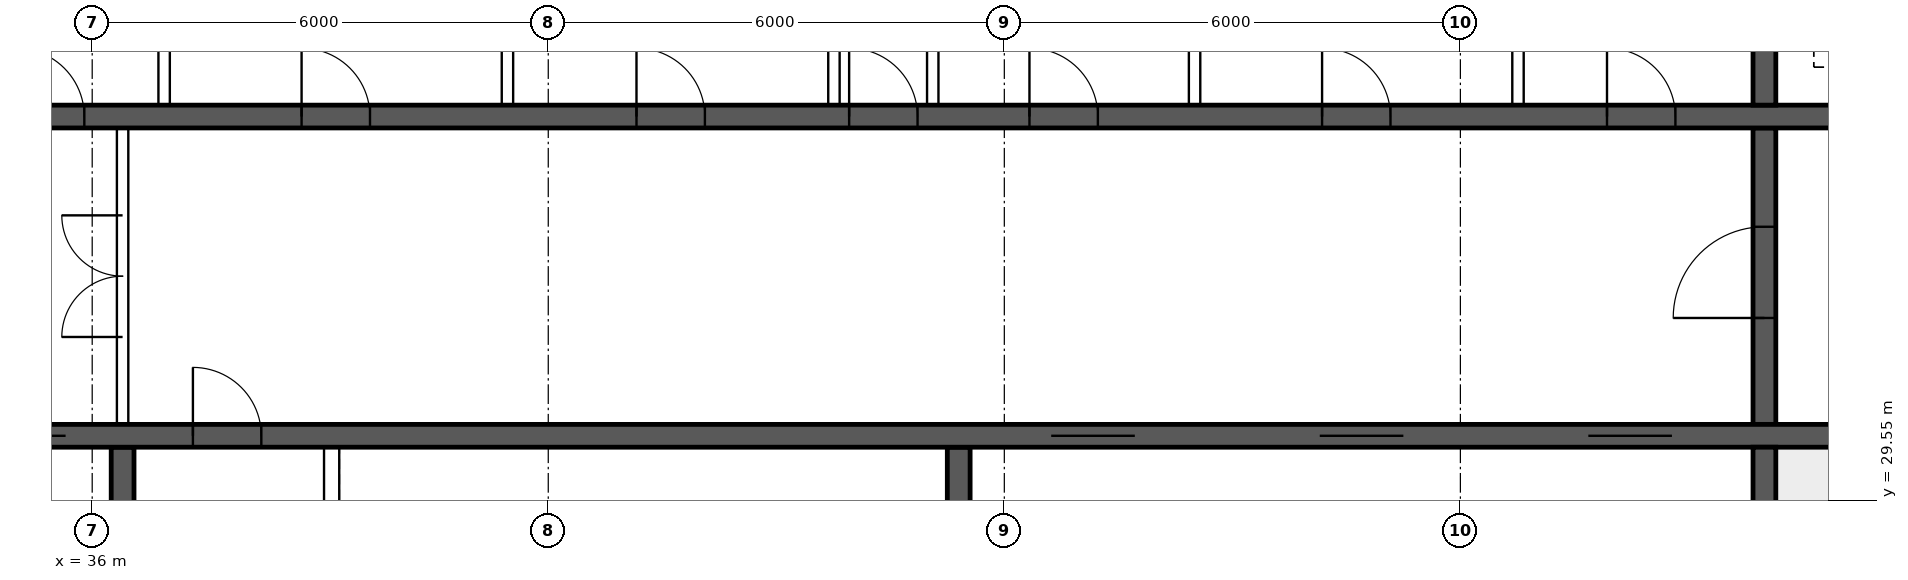
"""IFC4 building model, lengths in metres.
Left out: names, types, materials, properties, quantities, classifications, styles, units other than length and angle.
Written with IfcOpenShell. Run it as: python <this file> out.ifc"""

import sys

from ifc_helpers import new_model, si_unit, direction, frame, frame_2d, origin, place, context, subcontext, project, spatial, rectangle, extrude, element, fill, save


model = new_model("IFC4")
c1 = context("Model", 3, precision=1e-05, world=origin(), true_north=direction((0.0, 1.0)))
c2 = subcontext(c1, "Body", "Model", "MODEL_VIEW")
j1 = project(units=[si_unit("LENGTHUNIT", "METRE"), si_unit("PLANEANGLEUNIT", "RADIAN")], contexts=[c1])
p1 = place(None, origin())
s1 = spatial("IfcSite", under=j1, at=p1, CompositionType="ELEMENT")
p2 = place(p1, origin())
s2 = spatial("IfcBuilding", under=s1, at=p2, CompositionType="ELEMENT")
p3 = place(p2, frame((0.0, 0.0, 114.4)))
s3 = spatial("IfcBuildingStorey", under=s2, at=p3, CompositionType="ELEMENT", Elevation=114.4)
p4 = place(p3, frame((18.475, 30.4, 0.0), z_axis=(0.0, 0.0, 1.0), x_axis=(1.0, 0.0, 0.0)))
e1 = element("IfcWall", 1, at=p4, inside=s3, PredefinedType="SHEAR", context=c2, shape_type="SweptSolid", body=[
    extrude(rectangle(XDim=47.05, YDim=0.3, at=frame_2d((23.525, 0.0))), origin(), (0.0, 0.0, 1.0), 3.75),
])
p5 = place(p4, frame((0.4, 0.0, 0.0)))
e2 = element("IfcOpeningElement", 2, at=p5, cuts=e1, PredefinedType="OPENING", context=c2, shape_type="SweptSolid", body=[
    extrude(rectangle(XDim=1.0, YDim=2.1, at=frame_2d((0.5, 1.05))), frame((0.0, 0.16, 0.0), z_axis=(0.0, -1.0, 0.0), x_axis=(1.0, 0.0, 0.0)), (0.0, 0.0, 1.0), 0.32),
])
p6 = place(p4, frame((45.65, 0.0, 0.0)))
e3 = element("IfcOpeningElement", 3, at=p6, cuts=e1, PredefinedType="OPENING", context=c2, shape_type="SweptSolid", body=[
    extrude(rectangle(XDim=1.0, YDim=2.1, at=frame_2d((0.5, 1.05))), frame((0.0, 0.16, 0.0), z_axis=(0.0, -1.0, 0.0), x_axis=(1.0, 0.0, 0.0)), (0.0, 0.0, 1.0), 0.32),
])
p7 = place(p4, frame((8.275, 0.0, 0.0)))
e4 = element("IfcOpeningElement", 4, at=p7, cuts=e1, PredefinedType="OPENING", context=c2, shape_type="SweptSolid", body=[
    extrude(rectangle(XDim=1.1, YDim=2.1, at=frame_2d((0.55, 1.05))), frame((0.0, 0.16, 0.0), z_axis=(0.0, -1.0, 0.0), x_axis=(1.0, 0.0, 0.0)), (0.0, 0.0, 1.0), 0.32),
])
p8 = place(p4, frame((10.875, 0.0, 0.0)))
e5 = element("IfcOpeningElement", 5, at=p8, cuts=e1, PredefinedType="OPENING", context=c2, shape_type="SweptSolid", body=[
    extrude(rectangle(XDim=1.1, YDim=2.1, at=frame_2d((0.55, 1.05))), frame((0.0, 0.16, 0.0), z_axis=(0.0, -1.0, 0.0), x_axis=(1.0, 0.0, 0.0)), (0.0, 0.0, 1.0), 0.32),
])
p9 = place(p4, frame((13.475, 0.0, 0.0)))
e6 = element("IfcOpeningElement", 6, at=p9, cuts=e1, PredefinedType="OPENING", context=c2, shape_type="SweptSolid", body=[
    extrude(rectangle(XDim=1.1, YDim=2.1, at=frame_2d((0.55, 1.05))), frame((0.0, 0.16, 0.0), z_axis=(0.0, -1.0, 0.0), x_axis=(1.0, 0.0, 0.0)), (0.0, 0.0, 1.0), 0.32),
])
p10 = place(p4, frame((16.075, 0.0, 0.0)))
e7 = element("IfcOpeningElement", 7, at=p10, cuts=e1, PredefinedType="OPENING", context=c2, shape_type="SweptSolid", body=[
    extrude(rectangle(XDim=1.1, YDim=2.1, at=frame_2d((0.55, 1.05))), frame((0.0, 0.16, 0.0), z_axis=(0.0, -1.0, 0.0), x_axis=(1.0, 0.0, 0.0)), (0.0, 0.0, 1.0), 0.32),
])
p11 = place(p4, frame((18.85, 0.0, 0.0)))
e8 = element("IfcOpeningElement", 8, at=p11, cuts=e1, PredefinedType="OPENING", context=c2, shape_type="SweptSolid", body=[
    extrude(rectangle(XDim=0.9, YDim=2.1, at=frame_2d((0.45, 1.05))), frame((0.0, 0.16, 0.0), z_axis=(0.0, -1.0, 0.0), x_axis=(1.0, 0.0, 0.0)), (0.0, 0.0, 1.0), 0.32),
])
p12 = place(p4, frame((30.142, 0.0, 0.0)))
e9 = element("IfcOpeningElement", 9, at=p12, cuts=e1, PredefinedType="OPENING", context=c2, shape_type="SweptSolid", body=[
    extrude(rectangle(XDim=1.1, YDim=2.1, at=frame_2d((0.55, 1.05))), frame((0.0, 0.16, 0.0), z_axis=(0.0, -1.0, 0.0), x_axis=(1.0, 0.0, 0.0)), (0.0, 0.0, 1.0), 0.32),
])
p13 = place(p4, frame((33.675, 0.0, 0.0)))
e10 = element("IfcOpeningElement", 10, at=p13, cuts=e1, PredefinedType="OPENING", context=c2, shape_type="SweptSolid", body=[
    extrude(rectangle(XDim=1.1, YDim=2.1, at=frame_2d((0.55, 1.05))), frame((0.0, 0.16, 0.0), z_axis=(0.0, -1.0, 0.0), x_axis=(1.0, 0.0, 0.0)), (0.0, 0.0, 1.0), 0.32),
])
p14 = place(p4, frame((37.208, 0.0, 0.0)))
e11 = element("IfcOpeningElement", 11, at=p14, cuts=e1, PredefinedType="OPENING", context=c2, shape_type="SweptSolid", body=[
    extrude(rectangle(XDim=1.1, YDim=2.1, at=frame_2d((0.55, 1.05))), frame((0.0, 0.16, 0.0), z_axis=(0.0, -1.0, 0.0), x_axis=(1.0, 0.0, 0.0)), (0.0, 0.0, 1.0), 0.32),
])
p15 = place(p3, frame((18.475, 34.6, 0.0), z_axis=(0.0, 0.0, 1.0), x_axis=(1.0, 0.0, 0.0)))
e12 = element("IfcWall", 12, at=p15, inside=s3, PredefinedType="SHEAR", context=c2, shape_type="SweptSolid", body=[
    extrude(rectangle(XDim=47.05, YDim=0.3, at=frame_2d((23.525, 0.0))), origin(), (0.0, 0.0, 1.0), 3.75),
])
p16 = place(p15, frame((0.9, 0.0, 0.0)))
e13 = element("IfcOpeningElement", 13, at=p16, cuts=e12, PredefinedType="OPENING", context=c2, shape_type="SweptSolid", body=[
    extrude(rectangle(XDim=1.1, YDim=2.1, at=frame_2d((0.55, 1.05))), frame((0.0, 0.16, 0.0), z_axis=(0.0, -1.0, 0.0), x_axis=(1.0, 0.0, 0.0)), (0.0, 0.0, 1.0), 0.32),
])
p17 = place(p15, frame((45.05, 0.0, 0.0)))
e14 = element("IfcOpeningElement", 14, at=p17, cuts=e12, PredefinedType="OPENING", context=c2, shape_type="SweptSolid", body=[
    extrude(rectangle(XDim=1.1, YDim=2.1, at=frame_2d((0.55, 1.05))), frame((0.0, 0.16, 0.0), z_axis=(0.0, -1.0, 0.0), x_axis=(1.0, 0.0, 0.0)), (0.0, 0.0, 1.0), 0.32),
])
p18 = place(p15, frame((4.125, 0.0, 0.0)))
e15 = element("IfcOpeningElement", 15, at=p18, cuts=e12, PredefinedType="OPENING", context=c2, shape_type="SweptSolid", body=[
    extrude(rectangle(XDim=0.9, YDim=2.1, at=frame_2d((0.45, 1.05))), frame((0.0, 0.16, 0.0), z_axis=(0.0, -1.0, 0.0), x_axis=(1.0, 0.0, 0.0)), (0.0, 0.0, 1.0), 0.32),
])
p19 = place(p15, frame((42.025, 0.0, 0.0)))
e16 = element("IfcOpeningElement", 16, at=p19, cuts=e12, PredefinedType="OPENING", context=c2, shape_type="SweptSolid", body=[
    extrude(rectangle(XDim=0.9, YDim=2.1, at=frame_2d((0.45, 1.05))), frame((0.0, 0.16, 0.0), z_axis=(0.0, -1.0, 0.0), x_axis=(1.0, 0.0, 0.0)), (0.0, 0.0, 1.0), 0.32),
])
p20 = place(p15, frame((8.9, 0.0, 0.0)))
e17 = element("IfcOpeningElement", 17, at=p20, cuts=e12, PredefinedType="OPENING", context=c2, shape_type="SweptSolid", body=[
    extrude(rectangle(XDim=0.9, YDim=2.1, at=frame_2d((0.45, 1.05))), frame((0.0, 0.16, 0.0), z_axis=(0.0, -1.0, 0.0), x_axis=(1.0, 0.0, 0.0)), (0.0, 0.0, 1.0), 0.32),
])
p21 = place(p15, frame((12.874, 0.0, 0.0)))
e18 = element("IfcOpeningElement", 18, at=p21, cuts=e12, PredefinedType="OPENING", context=c2, shape_type="SweptSolid", body=[
    extrude(rectangle(XDim=0.9, YDim=2.1, at=frame_2d((0.45, 1.05))), frame((0.0, 0.16, 0.0), z_axis=(0.0, -1.0, 0.0), x_axis=(1.0, 0.0, 0.0)), (0.0, 0.0, 1.0), 0.32),
])
p22 = place(p15, frame((16.521, 0.0, 0.0)))
e19 = element("IfcOpeningElement", 19, at=p22, cuts=e12, PredefinedType="OPENING", context=c2, shape_type="SweptSolid", body=[
    extrude(rectangle(XDim=0.9, YDim=2.1, at=frame_2d((0.45, 1.05))), frame((0.0, 0.16, 0.0), z_axis=(0.0, -1.0, 0.0), x_axis=(1.0, 0.0, 0.0)), (0.0, 0.0, 1.0), 0.32),
])
p23 = place(p15, frame((20.28, 0.0, 0.0)))
e20 = element("IfcOpeningElement", 20, at=p23, cuts=e12, PredefinedType="OPENING", context=c2, shape_type="SweptSolid", body=[
    extrude(rectangle(XDim=0.9, YDim=2.1, at=frame_2d((0.45, 1.05))), frame((0.0, 0.16, 0.0), z_axis=(0.0, -1.0, 0.0), x_axis=(1.0, 0.0, 0.0)), (0.0, 0.0, 1.0), 0.32),
])
p24 = place(p15, frame((24.686, 0.0, 0.0)))
e21 = element("IfcOpeningElement", 21, at=p24, cuts=e12, PredefinedType="OPENING", context=c2, shape_type="SweptSolid", body=[
    extrude(rectangle(XDim=0.9, YDim=2.1, at=frame_2d((0.45, 1.05))), frame((0.0, 0.16, 0.0), z_axis=(0.0, -1.0, 0.0), x_axis=(1.0, 0.0, 0.0)), (0.0, 0.0, 1.0), 0.32),
])
p25 = place(p15, frame((27.483, 0.0, 0.0)))
e22 = element("IfcOpeningElement", 22, at=p25, cuts=e12, PredefinedType="OPENING", context=c2, shape_type="SweptSolid", body=[
    extrude(rectangle(XDim=0.9, YDim=2.1, at=frame_2d((0.45, 1.05))), frame((0.0, 0.16, 0.0), z_axis=(0.0, -1.0, 0.0), x_axis=(1.0, 0.0, 0.0)), (0.0, 0.0, 1.0), 0.32),
])
p26 = place(p15, frame((29.856, 0.0, 0.0)))
e23 = element("IfcOpeningElement", 23, at=p26, cuts=e12, PredefinedType="OPENING", context=c2, shape_type="SweptSolid", body=[
    extrude(rectangle(XDim=0.9, YDim=2.1, at=frame_2d((0.45, 1.05))), frame((0.0, 0.16, 0.0), z_axis=(0.0, -1.0, 0.0), x_axis=(1.0, 0.0, 0.0)), (0.0, 0.0, 1.0), 0.32),
])
p27 = place(p15, frame((33.706, 0.0, 0.0)))
e24 = element("IfcOpeningElement", 24, at=p27, cuts=e12, PredefinedType="OPENING", context=c2, shape_type="SweptSolid", body=[
    extrude(rectangle(XDim=0.9, YDim=2.1, at=frame_2d((0.45, 1.05))), frame((0.0, 0.16, 0.0), z_axis=(0.0, -1.0, 0.0), x_axis=(1.0, 0.0, 0.0)), (0.0, 0.0, 1.0), 0.32),
])
p28 = place(p15, frame((37.454, 0.0, 0.0)))
e25 = element("IfcOpeningElement", 25, at=p28, cuts=e12, PredefinedType="OPENING", context=c2, shape_type="SweptSolid", body=[
    extrude(rectangle(XDim=0.9, YDim=2.1, at=frame_2d((0.45, 1.05))), frame((0.0, 0.16, 0.0), z_axis=(0.0, -1.0, 0.0), x_axis=(1.0, 0.0, 0.0)), (0.0, 0.0, 1.0), 0.32),
])
p29 = place(p3, frame((58.0, 26.275, 0.0), z_axis=(0.0, 0.0, 1.0), x_axis=(0.0, 1.0, 0.0)))
e26 = element("IfcWall", 26, at=p29, inside=s3, PredefinedType="SHEAR", context=c2, shape_type="SweptSolid", body=[
    extrude(rectangle(XDim=3.975, YDim=0.3, at=frame_2d((1.988, 0.0))), origin(), (0.0, 0.0, 1.0), 3.75),
])
p30 = place(p3, frame((58.0, 30.55, 0.0), z_axis=(0.0, 0.0, 1.0), x_axis=(0.0, 1.0, 0.0)))
e27 = element("IfcWall", 27, at=p30, inside=s3, PredefinedType="SHEAR", context=c2, shape_type="SweptSolid", body=[
    extrude(rectangle(XDim=3.9, YDim=0.3, at=frame_2d((1.95, 0.0))), origin(), (0.0, 0.0, 1.0), 3.75),
])
p31 = place(p30, frame((1.4, 0.0, 0.0)))
e28 = element("IfcOpeningElement", 28, at=p31, cuts=e27, PredefinedType="OPENING", context=c2, shape_type="SweptSolid", body=[
    extrude(rectangle(XDim=1.2, YDim=2.1, at=frame_2d((0.6, 1.05))), frame((0.0, 0.16, 0.0), z_axis=(0.0, -1.0, 0.0), x_axis=(1.0, 0.0, 0.0)), (0.0, 0.0, 1.0), 0.32),
])
p32 = place(p3, frame((58.0, 34.75, 0.0), z_axis=(0.0, 0.0, 1.0), x_axis=(0.0, 1.0, 0.0)))
e29 = element("IfcWall", 29, at=p32, inside=s3, PredefinedType="SHEAR", context=c2, shape_type="SweptSolid", body=[
    extrude(rectangle(XDim=2.975, YDim=0.3, at=frame_2d((1.488, 0.0))), origin(), (0.0, 0.0, 1.0), 3.75),
])
for number, where, z_axis, x_axis in (
    (30, (36.4, 26.275, 0.0), (0.0, 0.0, 1.0), (0.0, 1.0, 0.0)),
    (31, (47.4, 26.275, 0.0), (0.0, 0.0, 1.0), (0.0, 1.0, 0.0)),
):
    element("IfcWall", number, at=place(p3, frame(where, z_axis=z_axis, x_axis=x_axis)), inside=s3, PredefinedType="SHEAR", context=c2, shape_type="SweptSolid", body=[
        extrude(rectangle(XDim=3.975, YDim=0.3, at=frame_2d((1.988, 0.0))), origin(), (0.0, 0.0, 1.0), 3.75),
    ])
p33 = place(p3, frame((36.4, 30.55, 0.0), z_axis=(0.0, 0.0, 1.0), x_axis=(0.0, 1.0, 0.0)))
e32 = element("IfcWall", 32, at=p33, inside=s3, PredefinedType="SOLIDWALL", context=c2, shape_type="SweptSolid", body=[
    extrude(rectangle(XDim=3.9, YDim=0.15, at=frame_2d((1.95, 0.0))), origin(), (0.0, 0.0, 1.0), 3.5),
])
p34 = place(p33, frame((1.15, 0.0, 0.0)))
e33 = element("IfcOpeningElement", 33, at=p34, cuts=e32, PredefinedType="OPENING", context=c2, shape_type="SweptSolid", body=[
    extrude(rectangle(XDim=1.6, YDim=2.1, at=frame_2d((0.8, 1.05))), frame((0.0, 0.085, 0.0), z_axis=(0.0, -1.0, 0.0), x_axis=(1.0, 0.0, 0.0)), (0.0, 0.0, 1.0), 0.17),
])
for number, where, z_axis, x_axis in (
    (34, (36.946, 34.75, 0.0), (0.0, 0.0, 1.0), (0.0, 1.0, 0.0)),
    (35, (41.463, 34.75, 0.0), (0.0, 0.0, 1.0), (0.0, 1.0, 0.0)),
    (36, (45.758, 34.75, 0.0), (0.0, 0.0, 1.0), (0.0, 1.0, 0.0)),
    (37, (47.058, 34.75, 0.0), (0.0, 0.0, 1.0), (0.0, 1.0, 0.0)),
    (38, (50.503, 34.75, 0.0), (0.0, 0.0, 1.0), (0.0, 1.0, 0.0)),
    (39, (54.758, 34.75, 0.0), (0.0, 0.0, 1.0), (0.0, 1.0, 0.0)),
):
    element("IfcWall", number, at=place(p3, frame(where, z_axis=z_axis, x_axis=x_axis)), inside=s3, PredefinedType="SOLIDWALL", context=c2, shape_type="SweptSolid", body=[
        extrude(rectangle(XDim=2.975, YDim=0.15, at=frame_2d((1.488, 0.0))), origin(), (0.0, 0.0, 1.0), 3.5),
    ])
p35 = place(p3, frame((39.15, 26.275, 0.0), z_axis=(0.0, 0.0, 1.0), x_axis=(0.0, 1.0, 0.0)))
e40 = element("IfcWall", 40, at=p35, inside=s3, PredefinedType="SOLIDWALL", context=c2, shape_type="SweptSolid", body=[
    extrude(rectangle(XDim=3.975, YDim=0.2, at=frame_2d((1.988, 0.0))), origin(), (0.0, 0.0, 1.0), 3.5),
])
p36 = place(p34, origin())
e41 = element("IfcDoor", 41, at=p36, inside=s3, OperationType="DOUBLE_DOOR_SINGLE_SWING", PredefinedType="DOOR", context=c2, shape_type="SweptSolid", body=[
    extrude(rectangle(XDim=1.6, YDim=2.1, at=frame_2d((0.8, 1.05))), frame((0.0, 0.025, 0.0), z_axis=(0.0, -1.0, 0.0), x_axis=(1.0, 0.0, 0.0)), (0.0, 0.0, 1.0), 0.05),
])
fill(e33, e41)
p37 = place(p31, origin())
e42 = element("IfcDoor", 42, at=p37, inside=s3, OperationType="SINGLE_SWING_LEFT", PredefinedType="DOOR", context=c2, shape_type="SweptSolid", body=[
    extrude(rectangle(XDim=1.2, YDim=2.1, at=frame_2d((0.6, 1.05))), frame((0.0, 0.025, 0.0), z_axis=(0.0, -1.0, 0.0), x_axis=(1.0, 0.0, 0.0)), (0.0, 0.0, 1.0), 0.05),
])
fill(e28, e42)
p38 = place(p22, origin())
e43 = element("IfcDoor", 43, at=p38, inside=s3, OperationType="SINGLE_SWING_LEFT", PredefinedType="DOOR", context=c2, shape_type="SweptSolid", body=[
    extrude(rectangle(XDim=0.9, YDim=2.1, at=frame_2d((0.45, 1.05))), frame((0.0, 0.025, 0.0), z_axis=(0.0, -1.0, 0.0), x_axis=(1.0, 0.0, 0.0)), (0.0, 0.0, 1.0), 0.05),
])
fill(e19, e43)
p39 = place(p23, origin())
e44 = element("IfcDoor", 44, at=p39, inside=s3, OperationType="SINGLE_SWING_LEFT", PredefinedType="DOOR", context=c2, shape_type="SweptSolid", body=[
    extrude(rectangle(XDim=0.9, YDim=2.1, at=frame_2d((0.45, 1.05))), frame((0.0, 0.025, 0.0), z_axis=(0.0, -1.0, 0.0), x_axis=(1.0, 0.0, 0.0)), (0.0, 0.0, 1.0), 0.05),
])
fill(e20, e44)
p40 = place(p24, origin())
e45 = element("IfcDoor", 45, at=p40, inside=s3, OperationType="SINGLE_SWING_LEFT", PredefinedType="DOOR", context=c2, shape_type="SweptSolid", body=[
    extrude(rectangle(XDim=0.9, YDim=2.1, at=frame_2d((0.45, 1.05))), frame((0.0, 0.025, 0.0), z_axis=(0.0, -1.0, 0.0), x_axis=(1.0, 0.0, 0.0)), (0.0, 0.0, 1.0), 0.05),
])
fill(e21, e45)
p41 = place(p25, origin())
e46 = element("IfcDoor", 46, at=p41, inside=s3, OperationType="SINGLE_SWING_LEFT", PredefinedType="DOOR", context=c2, shape_type="SweptSolid", body=[
    extrude(rectangle(XDim=0.9, YDim=2.1, at=frame_2d((0.45, 1.05))), frame((0.0, 0.025, 0.0), z_axis=(0.0, -1.0, 0.0), x_axis=(1.0, 0.0, 0.0)), (0.0, 0.0, 1.0), 0.05),
])
fill(e22, e46)
p42 = place(p26, origin())
e47 = element("IfcDoor", 47, at=p42, inside=s3, OperationType="SINGLE_SWING_LEFT", PredefinedType="DOOR", context=c2, shape_type="SweptSolid", body=[
    extrude(rectangle(XDim=0.9, YDim=2.1, at=frame_2d((0.45, 1.05))), frame((0.0, 0.025, 0.0), z_axis=(0.0, -1.0, 0.0), x_axis=(1.0, 0.0, 0.0)), (0.0, 0.0, 1.0), 0.05),
])
fill(e23, e47)
p43 = place(p27, origin())
e48 = element("IfcDoor", 48, at=p43, inside=s3, OperationType="SINGLE_SWING_LEFT", PredefinedType="DOOR", context=c2, shape_type="SweptSolid", body=[
    extrude(rectangle(XDim=0.9, YDim=2.1, at=frame_2d((0.45, 1.05))), frame((0.0, 0.025, 0.0), z_axis=(0.0, -1.0, 0.0), x_axis=(1.0, 0.0, 0.0)), (0.0, 0.0, 1.0), 0.05),
])
fill(e24, e48)
p44 = place(p28, origin())
e49 = element("IfcDoor", 49, at=p44, inside=s3, OperationType="SINGLE_SWING_LEFT", PredefinedType="DOOR", context=c2, shape_type="SweptSolid", body=[
    extrude(rectangle(XDim=0.9, YDim=2.1, at=frame_2d((0.45, 1.05))), frame((0.0, 0.025, 0.0), z_axis=(0.0, -1.0, 0.0), x_axis=(1.0, 0.0, 0.0)), (0.0, 0.0, 1.0), 0.05),
])
fill(e25, e49)
p45 = place(p10, origin())
e50 = element("IfcDoor", 50, at=p45, inside=s3, OperationType="DOUBLE_DOOR_SLIDING", PredefinedType="DOOR", context=c2, shape_type="SweptSolid", body=[
    extrude(rectangle(XDim=1.1, YDim=2.1, at=frame_2d((0.55, 1.05))), frame((0.0, 0.025, 0.0), z_axis=(0.0, -1.0, 0.0), x_axis=(1.0, 0.0, 0.0)), (0.0, 0.0, 1.0), 0.05),
])
fill(e7, e50)
p46 = place(p11, origin())
e51 = element("IfcDoor", 51, at=p46, inside=s3, OperationType="SINGLE_SWING_LEFT", PredefinedType="DOOR", context=c2, shape_type="SweptSolid", body=[
    extrude(rectangle(XDim=0.9, YDim=2.1, at=frame_2d((0.45, 1.05))), frame((0.0, 0.025, 0.0), z_axis=(0.0, -1.0, 0.0), x_axis=(1.0, 0.0, 0.0)), (0.0, 0.0, 1.0), 0.05),
])
fill(e8, e51)
p47 = place(p12, origin())
e52 = element("IfcDoor", 52, at=p47, inside=s3, OperationType="DOUBLE_DOOR_SLIDING", PredefinedType="DOOR", context=c2, shape_type="SweptSolid", body=[
    extrude(rectangle(XDim=1.1, YDim=2.1, at=frame_2d((0.55, 1.05))), frame((0.0, 0.025, 0.0), z_axis=(0.0, -1.0, 0.0), x_axis=(1.0, 0.0, 0.0)), (0.0, 0.0, 1.0), 0.05),
])
fill(e9, e52)
p48 = place(p13, origin())
e53 = element("IfcDoor", 53, at=p48, inside=s3, OperationType="DOUBLE_DOOR_SLIDING", PredefinedType="DOOR", context=c2, shape_type="SweptSolid", body=[
    extrude(rectangle(XDim=1.1, YDim=2.1, at=frame_2d((0.55, 1.05))), frame((0.0, 0.025, 0.0), z_axis=(0.0, -1.0, 0.0), x_axis=(1.0, 0.0, 0.0)), (0.0, 0.0, 1.0), 0.05),
])
fill(e10, e53)
p49 = place(p14, origin())
e54 = element("IfcDoor", 54, at=p49, inside=s3, OperationType="DOUBLE_DOOR_SLIDING", PredefinedType="DOOR", context=c2, shape_type="SweptSolid", body=[
    extrude(rectangle(XDim=1.1, YDim=2.1, at=frame_2d((0.55, 1.05))), frame((0.0, 0.025, 0.0), z_axis=(0.0, -1.0, 0.0), x_axis=(1.0, 0.0, 0.0)), (0.0, 0.0, 1.0), 0.05),
])
fill(e11, e54)
save(model, sys.argv[1])
